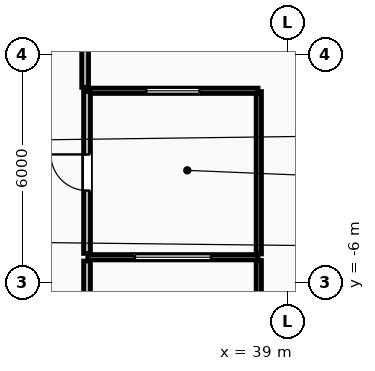
"""IFC4 building model, lengths in metres.
Left out: names, types, materials, properties, quantities, classifications, styles, units other than length and angle.
Written with IfcOpenShell. Run it as: python <this file> out.ifc"""

import sys

from ifc_helpers import new_model, si_unit, direction, frame, frame_2d, origin, place, context, subcontext, project, spatial, rectangle, extrude, element, fill, save


model = new_model("IFC4")
c1 = context("Model", 3, precision=1e-05, world=origin(), true_north=direction((0.0, 1.0)))
c2 = subcontext(c1, "Body", "Model", "MODEL_VIEW")
j1 = project(units=[si_unit("LENGTHUNIT", "METRE"), si_unit("PLANEANGLEUNIT", "RADIAN")], contexts=[c1])
p1 = place(None, origin())
s1 = spatial("IfcSite", under=j1, at=p1, CompositionType="ELEMENT")
p2 = place(p1, origin())
s2 = spatial("IfcBuilding", under=s1, at=p2, CompositionType="ELEMENT")
p3 = place(p2, frame((0.0, 0.0, 272.0)))
s3 = spatial("IfcBuildingStorey", under=s2, at=p3, CompositionType="ELEMENT", Elevation=272.0)
p4 = place(p3, frame((38.24, -9.59, 0.0), z_axis=(0.0, 0.0, 1.0), x_axis=(0.0, 1.0, 0.0)))
e1 = element("IfcWall", 1, at=p4, inside=s3, PredefinedType="PARTITIONING", context=c2, shape_type="SweptSolid", body=[
    extrude(rectangle(XDim=4.175, YDim=0.14, at=frame_2d((2.087, 0.0))), origin(), (0.0, 0.0, 1.0), 3.34),
])
p5 = place(p3, frame((38.24, -5.245, 0.0), z_axis=(0.0, 0.0, 1.0), x_axis=(0.0, 1.0, 0.0)))
e2 = element("IfcWall", 2, at=p5, inside=s3, PredefinedType="PARTITIONING", context=c2, shape_type="SweptSolid", body=[
    extrude(rectangle(XDim=4.275, YDim=0.14, at=frame_2d((2.138, 0.0))), origin(), (0.0, 0.0, 1.0), 3.34),
])
p6 = place(p3, frame((33.74, -0.95, 0.0), z_axis=(0.0, 0.0, 1.0), x_axis=(1.0, 0.0, 0.0)))
e3 = element("IfcWall", 3, at=p6, inside=s3, PredefinedType="PARTITIONING", context=c2, shape_type="SweptSolid", body=[
    extrude(rectangle(XDim=4.48, YDim=0.14, at=frame_2d((2.24, 0.0))), origin(), (0.0, 0.0, 1.0), 3.34),
])
p7 = place(p6, frame((1.54, 0.0, 1.05)))
e4 = element("IfcOpeningElement", 4, at=p7, cuts=e3, PredefinedType="OPENING", context=c2, shape_type="SweptSolid", body=[
    extrude(rectangle(XDim=1.4, YDim=1.5, at=frame_2d((0.7, 0.75))), frame((0.0, 0.08, 0.0), z_axis=(0.0, -1.0, 0.0), x_axis=(1.0, 0.0, 0.0)), (0.0, 0.0, 1.0), 0.16),
])
p8 = place(p3, frame((33.74, -5.33, 0.0), z_axis=(0.0, 0.0, 1.0), x_axis=(1.0, 0.0, 0.0)))
e5 = element("IfcWall", 5, at=p8, inside=s3, PredefinedType="PARTITIONING", context=c2, shape_type="SweptSolid", body=[
    extrude(rectangle(XDim=4.48, YDim=0.14, at=frame_2d((2.24, 0.0))), origin(), (0.0, 0.0, 1.0), 3.34),
])
p9 = place(p8, frame((1.24, 0.0, 1.05)))
e6 = element("IfcOpeningElement", 6, at=p9, cuts=e5, PredefinedType="OPENING", context=c2, shape_type="SweptSolid", body=[
    extrude(rectangle(XDim=2.0, YDim=1.5, at=frame_2d((1.0, 0.75))), frame((0.0, 0.08, 0.0), z_axis=(0.0, -1.0, 0.0), x_axis=(1.0, 0.0, 0.0)), (0.0, 0.0, 1.0), 0.16),
])
p10 = place(p3, frame((33.72, -5.23, 0.0), z_axis=(0.0, 0.0, 1.0), x_axis=(0.0, 1.0, 0.0)))
e7 = element("IfcWall", 7, at=p10, inside=s3, PredefinedType="PARTITIONING", context=c2, shape_type="SweptSolid", body=[
    extrude(rectangle(XDim=4.26, YDim=0.18, at=frame_2d((2.13, 0.0))), origin(), (0.0, 0.0, 1.0), 3.34),
])
p11 = place(p10, frame((1.655, 0.0, 0.0)))
e8 = element("IfcOpeningElement", 8, at=p11, cuts=e7, PredefinedType="OPENING", context=c2, shape_type="SweptSolid", body=[
    extrude(rectangle(XDim=0.95, YDim=2.1, at=frame_2d((0.475, 1.05))), frame((0.0, 0.1, 0.0), z_axis=(0.0, -1.0, 0.0), x_axis=(1.0, 0.0, 0.0)), (0.0, 0.0, 1.0), 0.2),
])
p12 = place(p3, frame((33.72, -9.59, 0.0), z_axis=(0.0, 0.0, 1.0), x_axis=(0.0, 1.0, 0.0)))
e9 = element("IfcWall", 9, at=p12, inside=s3, PredefinedType="PARTITIONING", context=c2, shape_type="SweptSolid", body=[
    extrude(rectangle(XDim=4.16, YDim=0.18, at=frame_2d((2.08, 0.0))), origin(), (0.0, 0.0, 1.0), 3.34),
])
p13 = place(p12, frame((1.58, 0.0, 0.0)))
e10 = element("IfcOpeningElement", 10, at=p13, cuts=e9, PredefinedType="OPENING", context=c2, shape_type="SweptSolid", body=[
    extrude(rectangle(XDim=1.0, YDim=2.15, at=frame_2d((0.5, 1.075))), frame((0.0, 0.1, 0.0), z_axis=(0.0, -1.0, 0.0), x_axis=(1.0, 0.0, 0.0)), (0.0, 0.0, 1.0), 0.2),
])
p14 = place(p3, frame((33.67, -0.859, 0.0), z_axis=(0.0, 0.0, 1.0), x_axis=(0.0, 1.0, 0.0)))
e11 = element("IfcWall", 11, at=p14, inside=s3, PredefinedType="PARTITIONING", context=c2, shape_type="SweptSolid", body=[
    extrude(rectangle(XDim=1.187, YDim=0.18, at=frame_2d((0.594, 0.0))), origin(), (0.0, 0.0, 1.0), 3.34),
])
p15 = place(p11, origin())
e12 = element("IfcDoor", 12, at=p15, inside=s3, OperationType="SINGLE_SWING_RIGHT", PredefinedType="DOOR", context=c2, shape_type="SweptSolid", body=[
    extrude(rectangle(XDim=0.95, YDim=2.1, at=frame_2d((0.475, 1.05))), frame((0.0, 0.025, 0.0), z_axis=(0.0, -1.0, 0.0), x_axis=(1.0, 0.0, 0.0)), (0.0, 0.0, 1.0), 0.05),
])
fill(e8, e12)
p16 = place(p7, origin())
e13 = element("IfcWindow", 13, at=p16, inside=s3, PartitioningType="SINGLE_PANEL", PredefinedType="WINDOW", context=c2, shape_type="SweptSolid", body=[
    extrude(rectangle(XDim=1.4, YDim=1.5, at=frame_2d((0.7, 0.75))), frame((0.0, 0.03, 0.0), z_axis=(0.0, -1.0, 0.0), x_axis=(1.0, 0.0, 0.0)), (0.0, 0.0, 1.0), 0.06),
])
fill(e4, e13)
p17 = place(p9, origin())
e14 = element("IfcWindow", 14, at=p17, inside=s3, PartitioningType="SINGLE_PANEL", PredefinedType="WINDOW", context=c2, shape_type="SweptSolid", body=[
    extrude(rectangle(XDim=2.0, YDim=1.5, at=frame_2d((1.0, 0.75))), frame((0.0, 0.03, 0.0), z_axis=(0.0, -1.0, 0.0), x_axis=(1.0, 0.0, 0.0)), (0.0, 0.0, 1.0), 0.06),
])
fill(e6, e14)
save(model, sys.argv[1])
